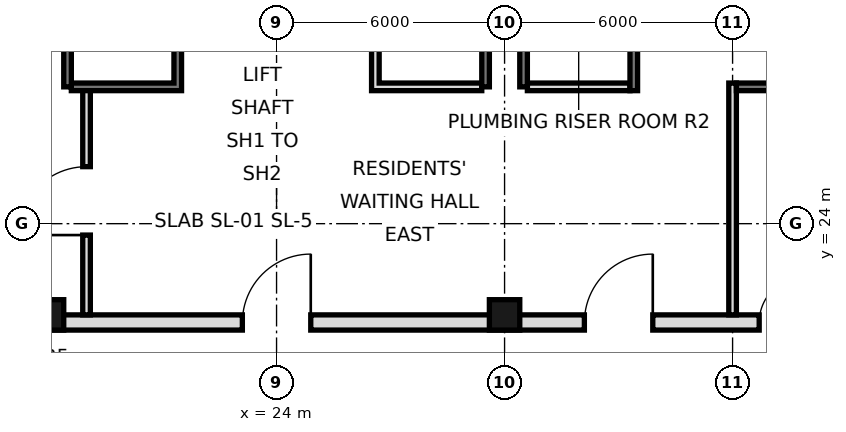
"""IFC4 building model, lengths in metres.
Left out: names, types, materials, properties, quantities, classifications, styles, units other than length and angle.
Written with IfcOpenShell. Run it as: python <this file> out.ifc"""

import sys

from ifc_helpers import new_model, si_unit, direction, frame, frame_2d, origin, origin_2d, place, context, subcontext, project, spatial, rectangle, hollow_rectangle, extrude, element, fill, save


model = new_model("IFC4")
c1 = context("Model", 3, precision=1e-05, world=origin(), true_north=direction((0.0, 1.0)))
c2 = subcontext(c1, "Body", "Model", "MODEL_VIEW")
j1 = project(units=[si_unit("LENGTHUNIT", "METRE"), si_unit("PLANEANGLEUNIT", "RADIAN")], contexts=[c1])
p1 = place(None, origin())
s1 = spatial("IfcSite", under=j1, at=p1, CompositionType="ELEMENT")
p2 = place(p1, origin())
s2 = spatial("IfcBuilding", under=s1, at=p2, CompositionType="ELEMENT")
p3 = place(p2, frame((0.0, 0.0, 30.0)))
s3 = spatial("IfcBuildingStorey", under=s2, at=p3, CompositionType="ELEMENT", Elevation=30.0)
for number, where, z_axis, x_axis in (
    (1, (18.0, 21.6, 0.0), (0.0, 0.0, 1.0), (1.0, 0.0, 0.0)),
    (2, (30.0, 21.6, 0.0), (0.0, 0.0, 1.0), (1.0, 0.0, 0.0)),
):
    element("IfcColumn", number, at=place(p3, frame(where, z_axis=z_axis, x_axis=x_axis)), inside=s3, PredefinedType="COLUMN", context=c2, shape_type="SweptSolid", body=[
        extrude(hollow_rectangle(XDim=0.8, YDim=0.8, WallThickness=0.07, at=origin_2d()), origin(), (0.0, 0.0, 1.0), 4.8),
    ])
for number, where, z_axis, x_axis in (
    (3, (18.5, 27.6, 0.0), (0.0, 0.0, 1.0), (0.0, 1.0, 0.0)),
    (4, (29.5, 27.6, 0.0), (0.0, 0.0, 1.0), (0.0, 1.0, 0.0)),
    (5, (30.5, 27.6, 0.0), (0.0, 0.0, 1.0), (0.0, 1.0, 0.0)),
):
    element("IfcWall", number, at=place(p3, frame(where, z_axis=z_axis, x_axis=x_axis)), inside=s3, PredefinedType="SOLIDWALL", context=c2, shape_type="SweptSolid", body=[
        extrude(rectangle(XDim=17.5, YDim=0.2, at=frame_2d((8.75, 0.0))), origin(), (0.0, 0.0, 1.0), 4.4),
    ])
p4 = place(p3, frame((5.6, 21.4, 0.0), z_axis=(0.0, 0.0, 1.0), x_axis=(1.0, 0.0, 0.0)))
e6 = element("IfcWall", 6, at=p4, inside=s3, PredefinedType="SOLIDWALL", context=c2, shape_type="SweptSolid", body=[
    extrude(rectangle(XDim=36.8, YDim=0.4, at=frame_2d((18.4, 0.0))), origin(), (0.0, 0.0, 1.0), 4.4),
])
p5 = place(p4, frame((8.5, 0.0, 0.0)))
e7 = element("IfcOpeningElement", 7, at=p5, cuts=e6, PredefinedType="OPENING", context=c2, shape_type="SweptSolid", body=[
    extrude(rectangle(XDim=1.8, YDim=2.1, at=frame_2d((0.9, 1.05))), frame((0.0, 0.21, 0.0), z_axis=(0.0, -1.0, 0.0), x_axis=(1.0, 0.0, 0.0)), (0.0, 0.0, 1.0), 0.42),
])
p6 = place(p4, frame((17.5, 0.0, 0.0)))
e8 = element("IfcOpeningElement", 8, at=p6, cuts=e6, PredefinedType="OPENING", context=c2, shape_type="SweptSolid", body=[
    extrude(rectangle(XDim=1.8, YDim=2.1, at=frame_2d((0.9, 1.05))), frame((0.0, 0.21, 0.0), z_axis=(0.0, -1.0, 0.0), x_axis=(1.0, 0.0, 0.0)), (0.0, 0.0, 1.0), 0.42),
])
p7 = place(p4, frame((26.5, 0.0, 0.0)))
e9 = element("IfcOpeningElement", 9, at=p7, cuts=e6, PredefinedType="OPENING", context=c2, shape_type="SweptSolid", body=[
    extrude(rectangle(XDim=1.8, YDim=2.1, at=frame_2d((0.9, 1.05))), frame((0.0, 0.21, 0.0), z_axis=(0.0, -1.0, 0.0), x_axis=(1.0, 0.0, 0.0)), (0.0, 0.0, 1.0), 0.42),
])
p8 = place(p4, frame((4.5, 0.0, 0.0)))
e10 = element("IfcOpeningElement", 10, at=p8, cuts=e6, PredefinedType="OPENING", context=c2, shape_type="SweptSolid", body=[
    extrude(rectangle(XDim=1.2, YDim=2.1, at=frame_2d((0.6, 1.05))), frame((0.0, 0.21, 0.0), z_axis=(0.0, -1.0, 0.0), x_axis=(1.0, 0.0, 0.0)), (0.0, 0.0, 1.0), 0.42),
])
p9 = place(p4, frame((31.1, 0.0, 0.0)))
e11 = element("IfcOpeningElement", 11, at=p9, cuts=e6, PredefinedType="OPENING", context=c2, shape_type="SweptSolid", body=[
    extrude(rectangle(XDim=1.2, YDim=2.1, at=frame_2d((0.6, 1.05))), frame((0.0, 0.21, 0.0), z_axis=(0.0, -1.0, 0.0), x_axis=(1.0, 0.0, 0.0)), (0.0, 0.0, 1.0), 0.42),
])
p10 = place(p3, frame((19.0, 21.6, 0.0), z_axis=(0.0, 0.0, 1.0), x_axis=(0.0, 1.0, 0.0)))
e12 = element("IfcWall", 12, at=p10, inside=s3, PredefinedType="PARTITIONING", context=c2, shape_type="SweptSolid", body=[
    extrude(rectangle(XDim=6.0, YDim=0.2, at=frame_2d((3.0, 0.0))), origin(), (0.0, 0.0, 1.0), 4.4),
])
p11 = place(p10, frame((2.1, 0.0, 0.0)))
e13 = element("IfcOpeningElement", 13, at=p11, cuts=e12, PredefinedType="OPENING", context=c2, shape_type="SweptSolid", body=[
    extrude(rectangle(XDim=1.8, YDim=2.1, at=frame_2d((0.9, 1.05))), frame((0.0, 0.11, 0.0), z_axis=(0.0, -1.0, 0.0), x_axis=(1.0, 0.0, 0.0)), (0.0, 0.0, 1.0), 0.22),
])
p12 = place(p3, frame((21.4, 27.5, 0.0), z_axis=(0.0, 0.0, 1.0), x_axis=(0.0, 1.0, 0.0)))
e14 = element("IfcWall", 14, at=p12, inside=s3, PredefinedType="SOLIDWALL", context=c2, shape_type="SweptSolid", body=[
    extrude(rectangle(XDim=17.5, YDim=0.2, at=frame_2d((8.75, 0.0))), origin(), (0.0, 0.0, 1.0), 4.4),
])
p13 = place(p12, frame((16.2, 0.0, 0.0)))
e15 = element("IfcOpeningElement", 15, at=p13, cuts=e14, PredefinedType="OPENING", context=c2, shape_type="SweptSolid", body=[
    extrude(rectangle(XDim=1.0, YDim=2.1, at=frame_2d((0.5, 1.05))), frame((0.0, 0.11, 0.0), z_axis=(0.0, -1.0, 0.0), x_axis=(1.0, 0.0, 0.0)), (0.0, 0.0, 1.0), 0.22),
])
p14 = place(p12, frame((7.4, 0.0, 0.0)))
e16 = element("IfcOpeningElement", 16, at=p14, cuts=e14, PredefinedType="OPENING", context=c2, shape_type="SweptSolid", body=[
    extrude(rectangle(XDim=0.9, YDim=2.1, at=frame_2d((0.45, 1.05))), frame((0.0, 0.11, 0.0), z_axis=(0.0, -1.0, 0.0), x_axis=(1.0, 0.0, 0.0)), (0.0, 0.0, 1.0), 0.22),
])
p15 = place(p3, frame((26.6, 27.5, 0.0), z_axis=(0.0, 0.0, 1.0), x_axis=(0.0, 1.0, 0.0)))
e17 = element("IfcWall", 17, at=p15, inside=s3, PredefinedType="SOLIDWALL", context=c2, shape_type="SweptSolid", body=[
    extrude(rectangle(XDim=17.5, YDim=0.2, at=frame_2d((8.75, 0.0))), origin(), (0.0, 0.0, 1.0), 4.4),
])
p16 = place(p15, frame((4.3, 0.0, 0.0)))
e18 = element("IfcOpeningElement", 18, at=p16, cuts=e17, PredefinedType="OPENING", context=c2, shape_type="SweptSolid", body=[
    extrude(rectangle(XDim=0.9, YDim=2.1, at=frame_2d((0.45, 1.05))), frame((0.0, 0.11, 0.0), z_axis=(0.0, -1.0, 0.0), x_axis=(1.0, 0.0, 0.0)), (0.0, 0.0, 1.0), 0.22),
])
p17 = place(p15, frame((10.35, 0.0, 0.0)))
e19 = element("IfcOpeningElement", 19, at=p17, cuts=e17, PredefinedType="OPENING", context=c2, shape_type="SweptSolid", body=[
    extrude(rectangle(XDim=1.0, YDim=2.1, at=frame_2d((0.5, 1.05))), frame((0.0, 0.11, 0.0), z_axis=(0.0, -1.0, 0.0), x_axis=(1.0, 0.0, 0.0)), (0.0, 0.0, 1.0), 0.22),
])
p18 = place(p3, frame((33.4, 27.5, 0.0), z_axis=(0.0, 0.0, 1.0), x_axis=(0.0, 1.0, 0.0)))
e20 = element("IfcWall", 20, at=p18, inside=s3, PredefinedType="SOLIDWALL", context=c2, shape_type="SweptSolid", body=[
    extrude(rectangle(XDim=17.5, YDim=0.2, at=frame_2d((8.75, 0.0))), origin(), (0.0, 0.0, 1.0), 4.4),
])
p19 = place(p18, frame((15.4, 0.0, 0.0)))
e21 = element("IfcOpeningElement", 21, at=p19, cuts=e20, PredefinedType="OPENING", context=c2, shape_type="SweptSolid", body=[
    extrude(rectangle(XDim=1.1, YDim=2.1, at=frame_2d((0.55, 1.05))), frame((0.0, 0.11, 0.0), z_axis=(0.0, -1.0, 0.0), x_axis=(1.0, 0.0, 0.0)), (0.0, 0.0, 1.0), 0.22),
])
p20 = place(p18, frame((2.7, 0.0, 0.0)))
e22 = element("IfcOpeningElement", 22, at=p20, cuts=e20, PredefinedType="OPENING", context=c2, shape_type="SweptSolid", body=[
    extrude(rectangle(XDim=1.0, YDim=2.1, at=frame_2d((0.5, 1.05))), frame((0.0, 0.11, 0.0), z_axis=(0.0, -1.0, 0.0), x_axis=(1.0, 0.0, 0.0)), (0.0, 0.0, 1.0), 0.22),
])
p21 = place(p18, frame((9.9, 0.0, 0.0)))
e23 = element("IfcOpeningElement", 23, at=p21, cuts=e20, PredefinedType="OPENING", context=c2, shape_type="SweptSolid", body=[
    extrude(rectangle(XDim=0.9, YDim=2.1, at=frame_2d((0.45, 1.05))), frame((0.0, 0.11, 0.0), z_axis=(0.0, -1.0, 0.0), x_axis=(1.0, 0.0, 0.0)), (0.0, 0.0, 1.0), 0.22),
])
p22 = place(p3, frame((36.0, 21.6, 0.0), z_axis=(0.0, 0.0, 1.0), x_axis=(0.0, 1.0, 0.0)))
e24 = element("IfcWall", 24, at=p22, inside=s3, PredefinedType="PARTITIONING", context=c2, shape_type="SweptSolid", body=[
    extrude(rectangle(XDim=6.1, YDim=0.2, at=frame_2d((3.05, 0.0))), origin(), (0.0, 0.0, 1.0), 4.4),
])
for number, where, z_axis, x_axis in (
    (25, (18.6, 27.6, 0.0), (0.0, 0.0, 1.0), (1.0, 0.0, 0.0)),
    (26, (26.7, 27.6, 0.0), (0.0, 0.0, 1.0), (1.0, 0.0, 0.0)),
):
    element("IfcWall", number, at=place(p3, frame(where, z_axis=z_axis, x_axis=x_axis)), inside=s3, PredefinedType="SOLIDWALL", context=c2, shape_type="SweptSolid", body=[
        extrude(rectangle(XDim=2.7, YDim=0.2, at=frame_2d((1.35, 0.0))), origin(), (0.0, 0.0, 1.0), 4.4),
    ])
p23 = place(p3, frame((30.6, 27.6, 0.0), z_axis=(0.0, 0.0, 1.0), x_axis=(1.0, 0.0, 0.0)))
e27 = element("IfcWall", 27, at=p23, inside=s3, PredefinedType="PARTITIONING", context=c2, shape_type="SweptSolid", body=[
    extrude(rectangle(XDim=2.7, YDim=0.2, at=frame_2d((1.35, 0.0))), origin(), (0.0, 0.0, 1.0), 4.4),
])
p24 = place(p3, frame((36.1, 27.6, 0.0), z_axis=(0.0, 0.0, 1.0), x_axis=(1.0, 0.0, 0.0)))
e28 = element("IfcWall", 28, at=p24, inside=s3, PredefinedType="SOLIDWALL", context=c2, shape_type="SweptSolid", body=[
    extrude(rectangle(XDim=5.3, YDim=0.2, at=frame_2d((2.65, 0.0))), origin(), (0.0, 0.0, 1.0), 4.4),
])
p25 = place(p11, origin())
e29 = element("IfcDoor", 29, at=p25, inside=s3, OperationType="SINGLE_SWING_LEFT", PredefinedType="DOOR", context=c2, shape_type="SweptSolid", body=[
    extrude(rectangle(XDim=1.8, YDim=2.1, at=frame_2d((0.9, 1.05))), frame((0.0, 0.025, 0.0), z_axis=(0.0, -1.0, 0.0), x_axis=(1.0, 0.0, 0.0)), (0.0, 0.0, 1.0), 0.05),
])
fill(e13, e29)
p26 = place(p6, frame((1.8, 0.0, 0.0), z_axis=(0.0, 0.0, 1.0), x_axis=(-1.0, 0.0, 0.0)))
e30 = element("IfcDoor", 30, at=p26, inside=s3, OperationType="SINGLE_SWING_LEFT", PredefinedType="DOOR", context=c2, shape_type="SweptSolid", body=[
    extrude(rectangle(XDim=1.8, YDim=2.1, at=frame_2d((0.9, 1.05))), frame((0.0, 0.025, 0.0), z_axis=(0.0, -1.0, 0.0), x_axis=(1.0, 0.0, 0.0)), (0.0, 0.0, 1.0), 0.05),
])
fill(e8, e30)
p27 = place(p7, frame((1.8, 0.0, 0.0), z_axis=(0.0, 0.0, 1.0), x_axis=(-1.0, 0.0, 0.0)))
e31 = element("IfcDoor", 31, at=p27, inside=s3, OperationType="SINGLE_SWING_LEFT", PredefinedType="DOOR", context=c2, shape_type="SweptSolid", body=[
    extrude(rectangle(XDim=1.8, YDim=2.1, at=frame_2d((0.9, 1.05))), frame((0.0, 0.025, 0.0), z_axis=(0.0, -1.0, 0.0), x_axis=(1.0, 0.0, 0.0)), (0.0, 0.0, 1.0), 0.05),
])
fill(e9, e31)
p28 = place(p9, frame((1.2, 0.0, 0.0), z_axis=(0.0, 0.0, 1.0), x_axis=(-1.0, 0.0, 0.0)))
e32 = element("IfcDoor", 32, at=p28, inside=s3, OperationType="SINGLE_SWING_LEFT", PredefinedType="DOOR", context=c2, shape_type="SweptSolid", body=[
    extrude(rectangle(XDim=1.2, YDim=2.1, at=frame_2d((0.6, 1.05))), frame((0.0, 0.025, 0.0), z_axis=(0.0, -1.0, 0.0), x_axis=(1.0, 0.0, 0.0)), (0.0, 0.0, 1.0), 0.05),
])
fill(e11, e32)
save(model, sys.argv[1])
